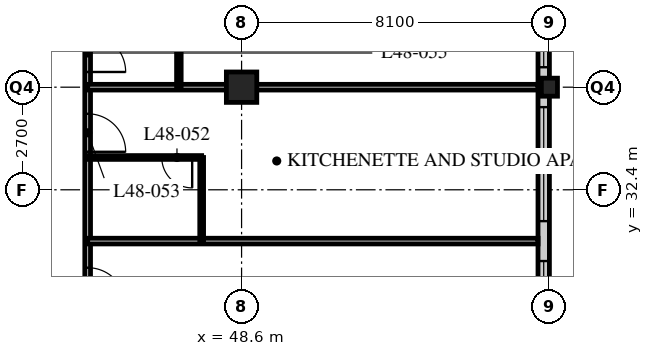
"""IFC4 building model, lengths in metres.
Left out: names, types, materials, properties, quantities, classifications, styles, units other than length and angle.
Written with IfcOpenShell. Run it as: python <this file> out.ifc"""

import sys

from ifc_helpers import new_model, si_unit, direction, frame, frame_2d, origin, origin_2d, place, context, subcontext, project, spatial, rectangle, hollow_rectangle, i_section, extrude, element, fill, save


model = new_model("IFC4")
c1 = context("Model", 3, precision=1e-05, world=origin(), true_north=direction((0.0, 1.0)))
c2 = subcontext(c1, "Body", "Model", "MODEL_VIEW")
j1 = project(units=[si_unit("LENGTHUNIT", "METRE"), si_unit("PLANEANGLEUNIT", "RADIAN")], contexts=[c1])
p1 = place(None, origin())
s1 = spatial("IfcSite", under=j1, at=p1, CompositionType="ELEMENT")
p2 = place(p1, origin())
s2 = spatial("IfcBuilding", under=s1, at=p2, CompositionType="ELEMENT")
p3 = place(p2, frame((0.0, 0.0, 188.4)))
s3 = spatial("IfcBuildingStorey", under=s2, at=p3, CompositionType="ELEMENT", Elevation=188.4)
p4 = place(p3, frame((48.6, 35.1, 0.0), z_axis=(0.0, 0.0, 1.0), x_axis=(1.0, 0.0, 0.0)))
e1 = element("IfcColumn", 1, at=p4, inside=s3, PredefinedType="COLUMN", context=c2, shape_type="SweptSolid", body=[
    extrude(hollow_rectangle(XDim=0.8, YDim=0.8, WallThickness=0.08, at=origin_2d()), origin(), (0.0, 0.0, 1.0), 3.6),
])
p5 = place(p3, frame((56.7, 35.1, 0.0), z_axis=(0.0, 0.0, 1.0), x_axis=(1.0, 0.0, 0.0)))
e2 = element("IfcColumn", 2, at=p5, inside=s3, PredefinedType="COLUMN", context=c2, shape_type="SweptSolid", body=[
    extrude(i_section(OverallWidth=0.424, OverallDepth=0.475, WebThickness=0.048, FlangeThickness=0.077, FilletRadius=0.015, at=origin_2d()), origin(), (0.0, 0.0, 1.0), 3.6),
])
p6 = place(p3, frame((56.55, 19.2, 0.0), z_axis=(0.0, 0.0, 1.0), x_axis=(0.0, 1.0, 0.0)))
e3 = element("IfcWall", 3, at=p6, inside=s3, PredefinedType="SOLIDWALL", context=c2, shape_type="SweptSolid", body=[
    extrude(rectangle(XDim=32.1, YDim=0.3, at=frame_2d((16.05, 0.0))), origin(), (0.0, 0.0, 1.0), 3.39),
])
p7 = place(p6, frame((0.225, 0.0, 0.6)))
e4 = element("IfcOpeningElement", 4, at=p7, cuts=e3, PredefinedType="OPENING", context=c2, shape_type="SweptSolid", body=[
    extrude(rectangle(XDim=3.0, YDim=2.4, at=frame_2d((1.5, 1.2))), frame((0.0, 0.16, 0.0), z_axis=(0.0, -1.0, 0.0), x_axis=(1.0, 0.0, 0.0)), (0.0, 0.0, 1.0), 0.32),
])
p8 = place(p6, frame((4.275, 0.0, 0.6)))
e5 = element("IfcOpeningElement", 5, at=p8, cuts=e3, PredefinedType="OPENING", context=c2, shape_type="SweptSolid", body=[
    extrude(rectangle(XDim=3.0, YDim=2.4, at=frame_2d((1.5, 1.2))), frame((0.0, 0.16, 0.0), z_axis=(0.0, -1.0, 0.0), x_axis=(1.0, 0.0, 0.0)), (0.0, 0.0, 1.0), 0.32),
])
p9 = place(p6, frame((8.325, 0.0, 0.6)))
e6 = element("IfcOpeningElement", 6, at=p9, cuts=e3, PredefinedType="OPENING", context=c2, shape_type="SweptSolid", body=[
    extrude(rectangle(XDim=3.0, YDim=2.4, at=frame_2d((1.5, 1.2))), frame((0.0, 0.16, 0.0), z_axis=(0.0, -1.0, 0.0), x_axis=(1.0, 0.0, 0.0)), (0.0, 0.0, 1.0), 0.32),
])
p10 = place(p6, frame((12.375, 0.0, 0.6)))
e7 = element("IfcOpeningElement", 7, at=p10, cuts=e3, PredefinedType="OPENING", context=c2, shape_type="SweptSolid", body=[
    extrude(rectangle(XDim=3.0, YDim=2.4, at=frame_2d((1.5, 1.2))), frame((0.0, 0.16, 0.0), z_axis=(0.0, -1.0, 0.0), x_axis=(1.0, 0.0, 0.0)), (0.0, 0.0, 1.0), 0.32),
])
p11 = place(p6, frame((16.425, 0.0, 0.6)))
e8 = element("IfcOpeningElement", 8, at=p11, cuts=e3, PredefinedType="OPENING", context=c2, shape_type="SweptSolid", body=[
    extrude(rectangle(XDim=3.0, YDim=2.4, at=frame_2d((1.5, 1.2))), frame((0.0, 0.16, 0.0), z_axis=(0.0, -1.0, 0.0), x_axis=(1.0, 0.0, 0.0)), (0.0, 0.0, 1.0), 0.32),
])
p12 = place(p6, frame((20.475, 0.0, 0.6)))
e9 = element("IfcOpeningElement", 9, at=p12, cuts=e3, PredefinedType="OPENING", context=c2, shape_type="SweptSolid", body=[
    extrude(rectangle(XDim=3.0, YDim=2.4, at=frame_2d((1.5, 1.2))), frame((0.0, 0.16, 0.0), z_axis=(0.0, -1.0, 0.0), x_axis=(1.0, 0.0, 0.0)), (0.0, 0.0, 1.0), 0.32),
])
p13 = place(p6, frame((24.525, 0.0, 0.6)))
e10 = element("IfcOpeningElement", 10, at=p13, cuts=e3, PredefinedType="OPENING", context=c2, shape_type="SweptSolid", body=[
    extrude(rectangle(XDim=3.0, YDim=2.4, at=frame_2d((1.5, 1.2))), frame((0.0, 0.16, 0.0), z_axis=(0.0, -1.0, 0.0), x_axis=(1.0, 0.0, 0.0)), (0.0, 0.0, 1.0), 0.32),
])
p14 = place(p6, frame((28.575, 0.0, 0.6)))
e11 = element("IfcOpeningElement", 11, at=p14, cuts=e3, PredefinedType="OPENING", context=c2, shape_type="SweptSolid", body=[
    extrude(rectangle(XDim=3.0, YDim=2.4, at=frame_2d((1.5, 1.2))), frame((0.0, 0.16, 0.0), z_axis=(0.0, -1.0, 0.0), x_axis=(1.0, 0.0, 0.0)), (0.0, 0.0, 1.0), 0.32),
])
p15 = place(p3, frame((44.55, 18.9, 0.0), z_axis=(0.0, 0.0, 1.0), x_axis=(0.0, 1.0, 0.0)))
e12 = element("IfcWall", 12, at=p15, inside=s3, PredefinedType="PARTITIONING", context=c2, shape_type="SweptSolid", body=[
    extrude(rectangle(XDim=28.35, YDim=0.15, at=frame_2d((14.175, 0.0))), origin(), (0.0, 0.0, 1.0), 3.39),
])
p16 = place(p15, frame((0.4, 0.0, 0.0)))
e13 = element("IfcOpeningElement", 13, at=p16, cuts=e12, PredefinedType="OPENING", context=c2, shape_type="SweptSolid", body=[
    extrude(rectangle(XDim=1.0, YDim=2.1, at=frame_2d((0.5, 1.05))), frame((0.0, 0.085, 0.0), z_axis=(0.0, -1.0, 0.0), x_axis=(1.0, 0.0, 0.0)), (0.0, 0.0, 1.0), 0.17),
])
p17 = place(p15, frame((10.45, 0.0, 0.0)))
e14 = element("IfcOpeningElement", 14, at=p17, cuts=e12, PredefinedType="OPENING", context=c2, shape_type="SweptSolid", body=[
    extrude(rectangle(XDim=1.0, YDim=2.1, at=frame_2d((0.5, 1.05))), frame((0.0, 0.085, 0.0), z_axis=(0.0, -1.0, 0.0), x_axis=(1.0, 0.0, 0.0)), (0.0, 0.0, 1.0), 0.17),
])
p18 = place(p15, frame((14.5, 0.0, 0.0)))
e15 = element("IfcOpeningElement", 15, at=p18, cuts=e12, PredefinedType="OPENING", context=c2, shape_type="SweptSolid", body=[
    extrude(rectangle(XDim=1.0, YDim=2.1, at=frame_2d((0.5, 1.05))), frame((0.0, 0.085, 0.0), z_axis=(0.0, -1.0, 0.0), x_axis=(1.0, 0.0, 0.0)), (0.0, 0.0, 1.0), 0.17),
])
p19 = place(p15, frame((16.6, 0.0, 0.0)))
e16 = element("IfcOpeningElement", 16, at=p19, cuts=e12, PredefinedType="OPENING", context=c2, shape_type="SweptSolid", body=[
    extrude(rectangle(XDim=1.0, YDim=2.1, at=frame_2d((0.5, 1.05))), frame((0.0, 0.085, 0.0), z_axis=(0.0, -1.0, 0.0), x_axis=(1.0, 0.0, 0.0)), (0.0, 0.0, 1.0), 0.17),
])
p20 = place(p15, frame((26.65, 0.0, 0.0)))
e17 = element("IfcOpeningElement", 17, at=p20, cuts=e12, PredefinedType="OPENING", context=c2, shape_type="SweptSolid", body=[
    extrude(rectangle(XDim=1.0, YDim=2.1, at=frame_2d((0.5, 1.05))), frame((0.0, 0.085, 0.0), z_axis=(0.0, -1.0, 0.0), x_axis=(1.0, 0.0, 0.0)), (0.0, 0.0, 1.0), 0.17),
])
p21 = place(p3, frame((44.55, 31.05, 0.0), z_axis=(0.0, 0.0, 1.0), x_axis=(1.0, 0.0, 0.0)))
e18 = element("IfcWall", 18, at=p21, inside=s3, PredefinedType="PARTITIONING", context=c2, shape_type="SweptSolid", body=[
    extrude(rectangle(XDim=11.85, YDim=0.15, at=frame_2d((5.925, 0.0))), origin(), (0.0, 0.0, 1.0), 3.39),
])
p22 = place(p3, frame((47.55, 31.05, 0.0), z_axis=(0.0, 0.0, 1.0), x_axis=(0.0, 1.0, 0.0)))
e19 = element("IfcWall", 19, at=p22, inside=s3, PredefinedType="PARTITIONING", context=c2, shape_type="SweptSolid", body=[
    extrude(rectangle(XDim=2.2, YDim=0.1, at=frame_2d((1.1, 0.0))), origin(), (0.0, 0.0, 1.0), 3.39),
])
p23 = place(p3, frame((44.55, 33.25, 0.0), z_axis=(0.0, 0.0, 1.0), x_axis=(1.0, 0.0, 0.0)))
e20 = element("IfcWall", 20, at=p23, inside=s3, PredefinedType="PARTITIONING", context=c2, shape_type="SweptSolid", body=[
    extrude(rectangle(XDim=3.0, YDim=0.1, at=frame_2d((1.5, 0.0))), origin(), (0.0, 0.0, 1.0), 3.39),
])
p24 = place(p23, frame((1.95, 0.0, 0.0)))
e21 = element("IfcOpeningElement", 21, at=p24, cuts=e20, PredefinedType="OPENING", context=c2, shape_type="SweptSolid", body=[
    extrude(rectangle(XDim=0.8, YDim=2.1, at=frame_2d((0.4, 1.05))), frame((0.0, 0.06, 0.0), z_axis=(0.0, -1.0, 0.0), x_axis=(1.0, 0.0, 0.0)), (0.0, 0.0, 1.0), 0.12),
])
p25 = place(p3, frame((44.55, 35.1, 0.0), z_axis=(0.0, 0.0, 1.0), x_axis=(1.0, 0.0, 0.0)))
e22 = element("IfcWall", 22, at=p25, inside=s3, PredefinedType="PARTITIONING", context=c2, shape_type="SweptSolid", body=[
    extrude(rectangle(XDim=11.85, YDim=0.15, at=frame_2d((5.925, 0.0))), origin(), (0.0, 0.0, 1.0), 2.778),
])
p26 = place(p3, frame((46.95, 35.1, 0.0), z_axis=(0.0, 0.0, 1.0), x_axis=(0.0, 1.0, 0.0)))
e23 = element("IfcWall", 23, at=p26, inside=s3, PredefinedType="PARTITIONING", context=c2, shape_type="SweptSolid", body=[
    extrude(rectangle(XDim=8.1, YDim=0.12, at=frame_2d((4.05, 0.0))), origin(), (0.0, 0.0, 1.0), 3.39),
])
p27 = place(p26, frame((0.975, 0.0, 0.0)))
e24 = element("IfcOpeningElement", 24, at=p27, cuts=e23, PredefinedType="OPENING", context=c2, shape_type="SweptSolid", body=[
    extrude(rectangle(XDim=0.85, YDim=2.1, at=frame_2d((0.425, 1.05))), frame((0.0, 0.07, 0.0), z_axis=(0.0, -1.0, 0.0), x_axis=(1.0, 0.0, 0.0)), (0.0, 0.0, 1.0), 0.14),
])
p28 = place(p26, frame((4.375, 0.0, 0.0)))
e25 = element("IfcOpeningElement", 25, at=p28, cuts=e23, PredefinedType="OPENING", context=c2, shape_type="SweptSolid", body=[
    extrude(rectangle(XDim=0.85, YDim=2.1, at=frame_2d((0.425, 1.05))), frame((0.0, 0.07, 0.0), z_axis=(0.0, -1.0, 0.0), x_axis=(1.0, 0.0, 0.0)), (0.0, 0.0, 1.0), 0.14),
])
p29 = place(p9, origin())
e26 = element("IfcWindow", 26, at=p29, inside=s3, PartitioningType="SINGLE_PANEL", PredefinedType="WINDOW", context=c2, shape_type="SweptSolid", body=[
    extrude(rectangle(XDim=3.0, YDim=2.4, at=frame_2d((1.5, 1.2))), frame((0.0, 0.03, 0.0), z_axis=(0.0, -1.0, 0.0), x_axis=(1.0, 0.0, 0.0)), (0.0, 0.0, 1.0), 0.06),
])
fill(e6, e26)
p30 = place(p10, origin())
e27 = element("IfcWindow", 27, at=p30, inside=s3, PartitioningType="SINGLE_PANEL", PredefinedType="WINDOW", context=c2, shape_type="SweptSolid", body=[
    extrude(rectangle(XDim=3.0, YDim=2.4, at=frame_2d((1.5, 1.2))), frame((0.0, 0.03, 0.0), z_axis=(0.0, -1.0, 0.0), x_axis=(1.0, 0.0, 0.0)), (0.0, 0.0, 1.0), 0.06),
])
fill(e7, e27)
p31 = place(p11, origin())
e28 = element("IfcWindow", 28, at=p31, inside=s3, PartitioningType="SINGLE_PANEL", PredefinedType="WINDOW", context=c2, shape_type="SweptSolid", body=[
    extrude(rectangle(XDim=3.0, YDim=2.4, at=frame_2d((1.5, 1.2))), frame((0.0, 0.03, 0.0), z_axis=(0.0, -1.0, 0.0), x_axis=(1.0, 0.0, 0.0)), (0.0, 0.0, 1.0), 0.06),
])
fill(e8, e28)
p32 = place(p17, origin())
e29 = element("IfcDoor", 29, at=p32, inside=s3, OperationType="SINGLE_SWING_RIGHT", PredefinedType="DOOR", context=c2, shape_type="SweptSolid", body=[
    extrude(rectangle(XDim=1.0, YDim=2.1, at=frame_2d((0.5, 1.05))), frame((0.0, 0.025, 0.0), z_axis=(0.0, -1.0, 0.0), x_axis=(1.0, 0.0, 0.0)), (0.0, 0.0, 1.0), 0.05),
])
fill(e14, e29)
p33 = place(p24, origin())
e30 = element("IfcDoor", 30, at=p33, inside=s3, OperationType="SINGLE_SWING_LEFT", PredefinedType="DOOR", context=c2, shape_type="SweptSolid", body=[
    extrude(rectangle(XDim=0.8, YDim=2.1, at=frame_2d((0.4, 1.05))), frame((0.0, 0.025, 0.0), z_axis=(0.0, -1.0, 0.0), x_axis=(1.0, 0.0, 0.0)), (0.0, 0.0, 1.0), 0.05),
])
fill(e21, e30)
p34 = place(p18, origin())
e31 = element("IfcDoor", 31, at=p34, inside=s3, OperationType="SINGLE_SWING_RIGHT", PredefinedType="DOOR", context=c2, shape_type="SweptSolid", body=[
    extrude(rectangle(XDim=1.0, YDim=2.1, at=frame_2d((0.5, 1.05))), frame((0.0, 0.025, 0.0), z_axis=(0.0, -1.0, 0.0), x_axis=(1.0, 0.0, 0.0)), (0.0, 0.0, 1.0), 0.05),
])
fill(e15, e31)
p35 = place(p19, origin())
e32 = element("IfcDoor", 32, at=p35, inside=s3, OperationType="SINGLE_SWING_RIGHT", PredefinedType="DOOR", context=c2, shape_type="SweptSolid", body=[
    extrude(rectangle(XDim=1.0, YDim=2.1, at=frame_2d((0.5, 1.05))), frame((0.0, 0.025, 0.0), z_axis=(0.0, -1.0, 0.0), x_axis=(1.0, 0.0, 0.0)), (0.0, 0.0, 1.0), 0.05),
])
fill(e16, e32)
save(model, sys.argv[1])
